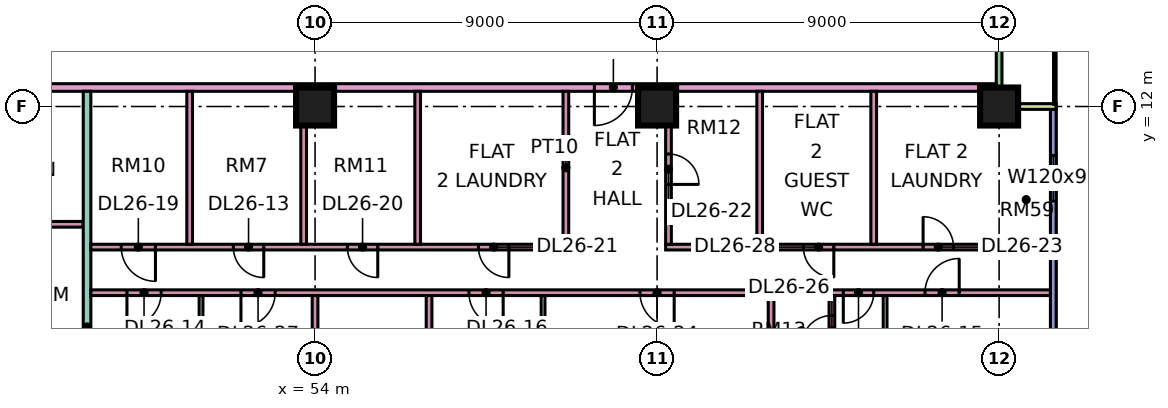
"""IFC4 building model, lengths in metres.
Left out: names, types, materials, properties, quantities, classifications, styles, units other than length and angle.
Written with IfcOpenShell. Run it as: python <this file> out.ifc"""

import sys

from ifc_helpers import new_model, si_unit, direction, frame, frame_2d, origin, origin_2d, place, context, subcontext, project, spatial, rectangle, extrude, element, fill, save


model = new_model("IFC4")
c1 = context("Model", 3, precision=1e-05, world=origin(), true_north=direction((0.0, 1.0)))
c2 = subcontext(c1, "Body", "Model", "MODEL_VIEW")
j1 = project(units=[si_unit("LENGTHUNIT", "METRE"), si_unit("PLANEANGLEUNIT", "RADIAN")], contexts=[c1])
p1 = place(None, origin())
s1 = spatial("IfcSite", under=j1, at=p1, CompositionType="ELEMENT")
p2 = place(p1, origin())
s2 = spatial("IfcBuilding", under=s1, at=p2, CompositionType="ELEMENT")
p3 = place(p2, frame((0.0, 0.0, 114.4)))
s3 = spatial("IfcBuildingStorey", under=s2, at=p3, CompositionType="ELEMENT", Elevation=114.4)
for number, where, z_axis, x_axis in (
    (1, (54.0, 12.0, 0.0), (0.0, 0.0, 1.0), (1.0, 0.0, 0.0)),
    (2, (63.0, 12.0, 0.0), (0.0, 0.0, 1.0), (1.0, 0.0, 0.0)),
    (3, (72.0, 12.0, 0.0), (0.0, 0.0, 1.0), (1.0, 0.0, 0.0)),
):
    element("IfcColumn", number, at=place(p3, frame(where, z_axis=z_axis, x_axis=x_axis)), inside=s3, PredefinedType="COLUMN", context=c2, shape_type="SweptSolid", body=[
        extrude(rectangle(XDim=1.0, YDim=1.0, at=origin_2d()), origin(), (0.0, 0.0, 1.0), 3.75),
    ])
p4 = place(p3, frame((73.425, 1.5, 0.0), z_axis=(0.0, 0.0, 1.0), x_axis=(0.0, 1.0, 0.0)))
e4 = element("IfcWall", 4, at=p4, inside=s3, PredefinedType="SOLIDWALL", context=c2, shape_type="SweptSolid", body=[
    extrude(rectangle(XDim=10.425, YDim=0.15, at=frame_2d((5.212, 0.0))), origin(), (0.0, 0.0, 1.0), 3.35),
])
p5 = place(p4, frame((1.3, 0.0, 0.45)))
e5 = element("IfcOpeningElement", 5, at=p5, cuts=e4, PredefinedType="OPENING", context=c2, shape_type="SweptSolid", body=[
    extrude(rectangle(XDim=3.0, YDim=2.4, at=frame_2d((1.5, 1.2))), frame((0.0, 0.085, 0.0), z_axis=(0.0, -1.0, 0.0), x_axis=(1.0, 0.0, 0.0)), (0.0, 0.0, 1.0), 0.17),
])
p6 = place(p4, frame((8.012, 0.0, 1.7)))
e6 = element("IfcOpeningElement", 6, at=p6, cuts=e4, PredefinedType="OPENING", context=c2, shape_type="SweptSolid", body=[
    extrude(rectangle(XDim=1.2, YDim=0.9, at=frame_2d((0.6, 0.45))), frame((0.0, 0.085, 0.0), z_axis=(0.0, -1.0, 0.0), x_axis=(1.0, 0.0, 0.0)), (0.0, 0.0, 1.0), 0.17),
])
p7 = place(p3, frame((72.0, 12.075, 0.0), z_axis=(0.0, 0.0, 1.0), x_axis=(0.0, 1.0, 0.0)))
e7 = element("IfcWall", 7, at=p7, inside=s3, PredefinedType="SOLIDWALL", context=c2, shape_type="SweptSolid", body=[
    extrude(rectangle(XDim=10.35, YDim=0.15, at=frame_2d((5.175, 0.0))), origin(), (0.0, 0.0, 1.0), 3.35),
])
p8 = place(p7, frame((3.975, 0.0, 0.45)))
e8 = element("IfcOpeningElement", 8, at=p8, cuts=e7, PredefinedType="OPENING", context=c2, shape_type="SweptSolid", body=[
    extrude(rectangle(XDim=2.4, YDim=2.4, at=frame_2d((1.2, 1.2))), frame((0.0, 0.085, 0.0), z_axis=(0.0, -1.0, 0.0), x_axis=(1.0, 0.0, 0.0)), (0.0, 0.0, 1.0), 0.17),
])
p9 = place(p7, frame((7.688, 0.0, 0.0)))
e9 = element("IfcOpeningElement", 9, at=p9, cuts=e7, PredefinedType="OPENING", context=c2, shape_type="SweptSolid", body=[
    extrude(rectangle(XDim=1.8, YDim=2.4, at=frame_2d((0.9, 1.2))), frame((0.0, 0.085, 0.0), z_axis=(0.0, -1.0, 0.0), x_axis=(1.0, 0.0, 0.0)), (0.0, 0.0, 1.0), 0.17),
])
p10 = place(p3, frame((73.5, 12.0, 0.0), z_axis=(0.0, 0.0, 1.0), x_axis=(-1.0, 0.0, 0.0)))
e10 = element("IfcWall", 10, at=p10, inside=s3, PredefinedType="SOLIDWALL", context=c2, shape_type="SweptSolid", body=[
    extrude(rectangle(XDim=1.5, YDim=0.15, at=frame_2d((0.75, 0.0))), origin(), (0.0, 0.0, 1.0), 3.35),
])
p11 = place(p3, frame((40.65, 12.5, 0.0), z_axis=(0.0, 0.0, 1.0), x_axis=(1.0, 0.0, 0.0)))
e11 = element("IfcWall", 11, at=p11, inside=s3, PredefinedType="PARTITIONING", context=c2, shape_type="SweptSolid", body=[
    extrude(rectangle(XDim=31.276, YDim=0.2, at=frame_2d((15.638, 0.0))), origin(), (0.0, 0.0, 1.0), 3.35),
])
p12 = place(p11, frame((20.7, 0.0, 0.0)))
e12 = element("IfcOpeningElement", 12, at=p12, cuts=e11, PredefinedType="OPENING", context=c2, shape_type="SweptSolid", body=[
    extrude(rectangle(XDim=1.0, YDim=2.1, at=frame_2d((0.5, 1.05))), frame((0.0, 0.11, 0.0), z_axis=(0.0, -1.0, 0.0), x_axis=(1.0, 0.0, 0.0)), (0.0, 0.0, 1.0), 0.22),
])
p13 = place(p11, frame((1.05, 0.0, 0.0)))
e13 = element("IfcOpeningElement", 13, at=p13, cuts=e11, PredefinedType="OPENING", context=c2, shape_type="SweptSolid", body=[
    extrude(rectangle(XDim=1.0, YDim=2.1, at=frame_2d((0.5, 1.05))), frame((0.0, 0.11, 0.0), z_axis=(0.0, -1.0, 0.0), x_axis=(1.0, 0.0, 0.0)), (0.0, 0.0, 1.0), 0.22),
])
p14 = place(p3, frame((43.725, 8.9, 0.0), z_axis=(0.0, 0.0, 1.0), x_axis=(1.0, 0.0, 0.0)))
e14 = element("IfcWall", 14, at=p14, inside=s3, PredefinedType="PARTITIONING", context=c2, shape_type="SweptSolid", body=[
    extrude(rectangle(XDim=4.175, YDim=0.15, at=frame_2d((2.087, 0.0))), origin(), (0.0, 0.0, 1.0), 3.35),
])
p15 = place(p3, frame((48.0, 0.0, 0.0), z_axis=(0.0, 0.0, 1.0), x_axis=(0.0, 1.0, 0.0)))
e15 = element("IfcWall", 15, at=p15, inside=s3, PredefinedType="PARTITIONING", context=c2, shape_type="SweptSolid", body=[
    extrude(rectangle(XDim=12.4, YDim=0.2, at=frame_2d((6.2, 0.0))), origin(), (0.0, 0.0, 1.0), 3.35),
])
p16 = place(p3, frame((48.1, 7.1, 0.0), z_axis=(0.0, 0.0, 1.0), x_axis=(1.0, 0.0, 0.0)))
e16 = element("IfcWall", 16, at=p16, inside=s3, PredefinedType="PARTITIONING", context=c2, shape_type="SweptSolid", body=[
    extrude(rectangle(XDim=25.25, YDim=0.15, at=frame_2d((12.625, 0.0))), origin(), (0.0, 0.0, 1.0), 3.35),
])
p17 = place(p16, frame((0.95, 0.0, 0.0)))
e17 = element("IfcOpeningElement", 17, at=p17, cuts=e16, PredefinedType="OPENING", context=c2, shape_type="SweptSolid", body=[
    extrude(rectangle(XDim=0.9, YDim=2.1, at=frame_2d((0.45, 1.05))), frame((0.0, 0.085, 0.0), z_axis=(0.0, -1.0, 0.0), x_axis=(1.0, 0.0, 0.0)), (0.0, 0.0, 1.0), 0.17),
])
p18 = place(p16, frame((21.95, 0.0, 0.0)))
e18 = element("IfcOpeningElement", 18, at=p18, cuts=e16, PredefinedType="OPENING", context=c2, shape_type="SweptSolid", body=[
    extrude(rectangle(XDim=0.9, YDim=2.1, at=frame_2d((0.45, 1.05))), frame((0.0, 0.085, 0.0), z_axis=(0.0, -1.0, 0.0), x_axis=(1.0, 0.0, 0.0)), (0.0, 0.0, 1.0), 0.17),
])
p19 = place(p16, frame((9.95, 0.0, 0.0)))
e19 = element("IfcOpeningElement", 19, at=p19, cuts=e16, PredefinedType="OPENING", context=c2, shape_type="SweptSolid", body=[
    extrude(rectangle(XDim=0.9, YDim=2.1, at=frame_2d((0.45, 1.05))), frame((0.0, 0.085, 0.0), z_axis=(0.0, -1.0, 0.0), x_axis=(1.0, 0.0, 0.0)), (0.0, 0.0, 1.0), 0.17),
])
p20 = place(p16, frame((14.45, 0.0, 0.0)))
e20 = element("IfcOpeningElement", 20, at=p20, cuts=e16, PredefinedType="OPENING", context=c2, shape_type="SweptSolid", body=[
    extrude(rectangle(XDim=0.9, YDim=2.1, at=frame_2d((0.45, 1.05))), frame((0.0, 0.085, 0.0), z_axis=(0.0, -1.0, 0.0), x_axis=(1.0, 0.0, 0.0)), (0.0, 0.0, 1.0), 0.17),
])
p21 = place(p16, frame((19.8, 0.0, 0.0)))
e21 = element("IfcOpeningElement", 21, at=p21, cuts=e16, PredefinedType="OPENING", context=c2, shape_type="SweptSolid", body=[
    extrude(rectangle(XDim=0.8, YDim=2.1, at=frame_2d((0.4, 1.05))), frame((0.0, 0.085, 0.0), z_axis=(0.0, -1.0, 0.0), x_axis=(1.0, 0.0, 0.0)), (0.0, 0.0, 1.0), 0.17),
])
p22 = place(p16, frame((3.95, 0.0, 0.0)))
e22 = element("IfcOpeningElement", 22, at=p22, cuts=e16, PredefinedType="OPENING", context=c2, shape_type="SweptSolid", body=[
    extrude(rectangle(XDim=0.9, YDim=2.1, at=frame_2d((0.45, 1.05))), frame((0.0, 0.085, 0.0), z_axis=(0.0, -1.0, 0.0), x_axis=(1.0, 0.0, 0.0)), (0.0, 0.0, 1.0), 0.17),
])
p23 = place(p3, frame((48.1, 8.3, 0.0), z_axis=(0.0, 0.0, 1.0), x_axis=(1.0, 0.0, 0.0)))
e23 = element("IfcWall", 23, at=p23, inside=s3, PredefinedType="PARTITIONING", context=c2, shape_type="SweptSolid", body=[
    extrude(rectangle(XDim=12.575, YDim=0.15, at=frame_2d((6.288, 0.0))), origin(), (0.0, 0.0, 1.0), 3.35),
])
p24 = place(p23, frame((3.75, 0.0, 0.0)))
e24 = element("IfcOpeningElement", 24, at=p24, cuts=e23, PredefinedType="OPENING", context=c2, shape_type="SweptSolid", body=[
    extrude(rectangle(XDim=0.8, YDim=2.1, at=frame_2d((0.4, 1.05))), frame((0.0, 0.085, 0.0), z_axis=(0.0, -1.0, 0.0), x_axis=(1.0, 0.0, 0.0)), (0.0, 0.0, 1.0), 0.17),
])
p25 = place(p23, frame((0.8, 0.0, 0.0)))
e25 = element("IfcOpeningElement", 25, at=p25, cuts=e23, PredefinedType="OPENING", context=c2, shape_type="SweptSolid", body=[
    extrude(rectangle(XDim=0.9, YDim=2.1, at=frame_2d((0.45, 1.05))), frame((0.0, 0.085, 0.0), z_axis=(0.0, -1.0, 0.0), x_axis=(1.0, 0.0, 0.0)), (0.0, 0.0, 1.0), 0.17),
])
p26 = place(p23, frame((6.75, 0.0, 0.0)))
e26 = element("IfcOpeningElement", 26, at=p26, cuts=e23, PredefinedType="OPENING", context=c2, shape_type="SweptSolid", body=[
    extrude(rectangle(XDim=0.8, YDim=2.1, at=frame_2d((0.4, 1.05))), frame((0.0, 0.085, 0.0), z_axis=(0.0, -1.0, 0.0), x_axis=(1.0, 0.0, 0.0)), (0.0, 0.0, 1.0), 0.17),
])
p27 = place(p23, frame((10.2, 0.0, 0.0)))
e27 = element("IfcOpeningElement", 27, at=p27, cuts=e23, PredefinedType="OPENING", context=c2, shape_type="SweptSolid", body=[
    extrude(rectangle(XDim=0.8, YDim=2.1, at=frame_2d((0.4, 1.05))), frame((0.0, 0.085, 0.0), z_axis=(0.0, -1.0, 0.0), x_axis=(1.0, 0.0, 0.0)), (0.0, 0.0, 1.0), 0.17),
])
p28 = place(p3, frame((50.7, 8.375, 0.0), z_axis=(0.0, 0.0, 1.0), x_axis=(0.0, 1.0, 0.0)))
e28 = element("IfcWall", 28, at=p28, inside=s3, PredefinedType="PARTITIONING", context=c2, shape_type="SweptSolid", body=[
    extrude(rectangle(XDim=4.025, YDim=0.15, at=frame_2d((2.012, 0.0))), origin(), (0.0, 0.0, 1.0), 3.35),
])
p29 = place(p3, frame((51.0, -1.35, 0.0), z_axis=(0.0, 0.0, 1.0), x_axis=(0.0, 1.0, 0.0)))
e29 = element("IfcWall", 29, at=p29, inside=s3, PredefinedType="PARTITIONING", context=c2, shape_type="SweptSolid", body=[
    extrude(rectangle(XDim=8.375, YDim=0.1, at=frame_2d((4.188, 0.0))), origin(), (0.0, 0.0, 1.0), 3.35),
])
p30 = place(p3, frame((53.7, 8.375, 0.0), z_axis=(0.0, 0.0, 1.0), x_axis=(0.0, 1.0, 0.0)))
e30 = element("IfcWall", 30, at=p30, inside=s3, PredefinedType="PARTITIONING", context=c2, shape_type="SweptSolid", body=[
    extrude(rectangle(XDim=4.025, YDim=0.15, at=frame_2d((2.012, 0.0))), origin(), (0.0, 0.0, 1.0), 3.35),
])
p31 = place(p3, frame((54.0, 0.0, 0.0), z_axis=(0.0, 0.0, 1.0), x_axis=(0.0, 1.0, 0.0)))
e31 = element("IfcWall", 31, at=p31, inside=s3, PredefinedType="PARTITIONING", context=c2, shape_type="SweptSolid", body=[
    extrude(rectangle(XDim=7.025, YDim=0.15, at=frame_2d((3.512, 0.0))), origin(), (0.0, 0.0, 1.0), 3.35),
])
p32 = place(p3, frame((56.7, 8.375, 0.0), z_axis=(0.0, 0.0, 1.0), x_axis=(0.0, 1.0, 0.0)))
e32 = element("IfcWall", 32, at=p32, inside=s3, PredefinedType="PARTITIONING", context=c2, shape_type="SweptSolid", body=[
    extrude(rectangle(XDim=4.025, YDim=0.15, at=frame_2d((2.012, 0.0))), origin(), (0.0, 0.0, 1.0), 3.35),
])
p33 = place(p3, frame((57.0, 4.025, 0.0), z_axis=(0.0, 0.0, 1.0), x_axis=(0.0, 1.0, 0.0)))
e33 = element("IfcWall", 33, at=p33, inside=s3, PredefinedType="PARTITIONING", context=c2, shape_type="SweptSolid", body=[
    extrude(rectangle(XDim=3.0, YDim=0.15, at=frame_2d((1.5, 0.0))), origin(), (0.0, 0.0, 1.0), 3.35),
])
p34 = place(p33, frame((1.225, 0.0, 0.0)))
e34 = element("IfcOpeningElement", 34, at=p34, cuts=e33, PredefinedType="OPENING", context=c2, shape_type="SweptSolid", body=[
    extrude(rectangle(XDim=0.8, YDim=2.1, at=frame_2d((0.4, 1.05))), frame((0.0, 0.085, 0.0), z_axis=(0.0, -1.0, 0.0), x_axis=(1.0, 0.0, 0.0)), (0.0, 0.0, 1.0), 0.17),
])
p35 = place(p3, frame((60.0, 0.0, 0.0), z_axis=(0.0, 0.0, 1.0), x_axis=(0.0, 1.0, 0.0)))
e35 = element("IfcWall", 35, at=p35, inside=s3, PredefinedType="PARTITIONING", context=c2, shape_type="SweptSolid", body=[
    extrude(rectangle(XDim=7.025, YDim=0.1, at=frame_2d((3.512, 0.0))), origin(), (0.0, 0.0, 1.0), 3.35),
])
p36 = place(p3, frame((60.6, 8.375, 0.0), z_axis=(0.0, 0.0, 1.0), x_axis=(0.0, 1.0, 0.0)))
e36 = element("IfcWall", 36, at=p36, inside=s3, PredefinedType="PARTITIONING", context=c2, shape_type="SweptSolid", body=[
    extrude(rectangle(XDim=4.025, YDim=0.15, at=frame_2d((2.012, 0.0))), origin(), (0.0, 0.0, 1.0), 3.35),
])
p37 = place(p3, frame((63.225, 8.3, 0.0), z_axis=(0.0, 0.0, 1.0), x_axis=(1.0, 0.0, 0.0)))
e37 = element("IfcWall", 37, at=p37, inside=s3, PredefinedType="PARTITIONING", context=c2, shape_type="SweptSolid", body=[
    extrude(rectangle(XDim=10.125, YDim=0.15, at=frame_2d((5.062, 0.0))), origin(), (0.0, 0.0, 1.0), 3.35),
])
p38 = place(p37, frame((6.775, 0.0, 0.0)))
e38 = element("IfcOpeningElement", 38, at=p38, cuts=e37, PredefinedType="OPENING", context=c2, shape_type="SweptSolid", body=[
    extrude(rectangle(XDim=0.8, YDim=2.1, at=frame_2d((0.4, 1.05))), frame((0.0, 0.085, 0.0), z_axis=(0.0, -1.0, 0.0), x_axis=(1.0, 0.0, 0.0)), (0.0, 0.0, 1.0), 0.17),
])
p39 = place(p37, frame((3.625, 0.0, 0.0)))
e39 = element("IfcOpeningElement", 39, at=p39, cuts=e37, PredefinedType="OPENING", context=c2, shape_type="SweptSolid", body=[
    extrude(rectangle(XDim=0.8, YDim=2.1, at=frame_2d((0.4, 1.05))), frame((0.0, 0.085, 0.0), z_axis=(0.0, -1.0, 0.0), x_axis=(1.0, 0.0, 0.0)), (0.0, 0.0, 1.0), 0.17),
])
p40 = place(p3, frame((63.3, 8.375, 0.0), z_axis=(0.0, 0.0, 1.0), x_axis=(0.0, 1.0, 0.0)))
e40 = element("IfcWall", 40, at=p40, inside=s3, PredefinedType="PARTITIONING", context=c2, shape_type="SweptSolid", body=[
    extrude(rectangle(XDim=4.025, YDim=0.15, at=frame_2d((2.012, 0.0))), origin(), (0.0, 0.0, 1.0), 3.35),
])
p41 = place(p40, frame((1.575, 0.0, 0.0)))
e41 = element("IfcOpeningElement", 41, at=p41, cuts=e40, PredefinedType="OPENING", context=c2, shape_type="SweptSolid", body=[
    extrude(rectangle(XDim=0.8, YDim=2.1, at=frame_2d((0.4, 1.05))), frame((0.0, 0.085, 0.0), z_axis=(0.0, -1.0, 0.0), x_axis=(1.0, 0.0, 0.0)), (0.0, 0.0, 1.0), 0.17),
])
p42 = place(p3, frame((65.7, 8.375, 0.0), z_axis=(0.0, 0.0, 1.0), x_axis=(0.0, 1.0, 0.0)))
e42 = element("IfcWall", 42, at=p42, inside=s3, PredefinedType="PARTITIONING", context=c2, shape_type="SweptSolid", body=[
    extrude(rectangle(XDim=4.025, YDim=0.15, at=frame_2d((2.012, 0.0))), origin(), (0.0, 0.0, 1.0), 3.35),
])
p43 = place(p3, frame((66.0, 0.074, 0.0), z_axis=(0.0, 0.0, 1.0), x_axis=(0.0, 1.0, 0.0)))
e43 = element("IfcWall", 43, at=p43, inside=s3, PredefinedType="PARTITIONING", context=c2, shape_type="SweptSolid", body=[
    extrude(rectangle(XDim=6.951, YDim=0.15, at=frame_2d((3.476, 0.0))), origin(), (0.0, 0.0, 1.0), 3.35),
])
p44 = place(p3, frame((67.6, 5.025, 0.0), z_axis=(0.0, 0.0, 1.0), x_axis=(0.0, 1.0, 0.0)))
e44 = element("IfcWall", 44, at=p44, inside=s3, PredefinedType="PARTITIONING", context=c2, shape_type="SweptSolid", body=[
    extrude(rectangle(XDim=2.0, YDim=0.15, at=frame_2d((1.0, 0.0))), origin(), (0.0, 0.0, 1.0), 3.35),
])
p45 = place(p44, frame((0.675, 0.0, 0.0)))
e45 = element("IfcOpeningElement", 45, at=p45, cuts=e44, PredefinedType="OPENING", context=c2, shape_type="SweptSolid", body=[
    extrude(rectangle(XDim=0.8, YDim=2.1, at=frame_2d((0.4, 1.05))), frame((0.0, 0.085, 0.0), z_axis=(0.0, -1.0, 0.0), x_axis=(1.0, 0.0, 0.0)), (0.0, 0.0, 1.0), 0.17),
])
p46 = place(p3, frame((68.7, 8.375, 0.0), z_axis=(0.0, 0.0, 1.0), x_axis=(0.0, 1.0, 0.0)))
e46 = element("IfcWall", 46, at=p46, inside=s3, PredefinedType="PARTITIONING", context=c2, shape_type="SweptSolid", body=[
    extrude(rectangle(XDim=4.025, YDim=0.15, at=frame_2d((2.012, 0.0))), origin(), (0.0, 0.0, 1.0), 3.35),
])
p47 = place(p3, frame((69.0, 0.074, 0.0), z_axis=(0.0, 0.0, 1.0), x_axis=(0.0, 1.0, 0.0)))
e47 = element("IfcWall", 47, at=p47, inside=s3, PredefinedType="PARTITIONING", context=c2, shape_type="SweptSolid", body=[
    extrude(rectangle(XDim=6.951, YDim=0.1, at=frame_2d((3.476, 0.0))), origin(), (0.0, 0.0, 1.0), 3.35),
])
p48 = place(p6, origin())
e48 = element("IfcWindow", 48, at=p48, inside=s3, PartitioningType="SINGLE_PANEL", PredefinedType="WINDOW", context=c2, shape_type="SweptSolid", body=[
    extrude(rectangle(XDim=1.2, YDim=0.9, at=frame_2d((0.6, 0.45))), frame((0.0, 0.03, 0.0), z_axis=(0.0, -1.0, 0.0), x_axis=(1.0, 0.0, 0.0)), (0.0, 0.0, 1.0), 0.06),
])
fill(e6, e48)
p49 = place(p24, origin())
e49 = element("IfcDoor", 49, at=p49, inside=s3, OperationType="SINGLE_SWING_RIGHT", PredefinedType="DOOR", context=c2, shape_type="SweptSolid", body=[
    extrude(rectangle(XDim=0.8, YDim=2.1, at=frame_2d((0.4, 1.05))), frame((0.0, 0.025, 0.0), z_axis=(0.0, -1.0, 0.0), x_axis=(1.0, 0.0, 0.0)), (0.0, 0.0, 1.0), 0.05),
])
fill(e24, e49)
p50 = place(p17, frame((0.9, 0.0, 0.0), z_axis=(0.0, 0.0, 1.0), x_axis=(-1.0, 0.0, 0.0)))
e50 = element("IfcDoor", 50, at=p50, inside=s3, OperationType="SINGLE_SWING_LEFT", PredefinedType="DOOR", context=c2, shape_type="SweptSolid", body=[
    extrude(rectangle(XDim=0.9, YDim=2.1, at=frame_2d((0.45, 1.05))), frame((0.0, 0.025, 0.0), z_axis=(0.0, -1.0, 0.0), x_axis=(1.0, 0.0, 0.0)), (0.0, 0.0, 1.0), 0.05),
])
fill(e17, e50)
p51 = place(p18, frame((0.9, 0.0, 0.0), z_axis=(0.0, 0.0, 1.0), x_axis=(-1.0, 0.0, 0.0)))
e51 = element("IfcDoor", 51, at=p51, inside=s3, OperationType="SINGLE_SWING_RIGHT", PredefinedType="DOOR", context=c2, shape_type="SweptSolid", body=[
    extrude(rectangle(XDim=0.9, YDim=2.1, at=frame_2d((0.45, 1.05))), frame((0.0, 0.025, 0.0), z_axis=(0.0, -1.0, 0.0), x_axis=(1.0, 0.0, 0.0)), (0.0, 0.0, 1.0), 0.05),
])
fill(e18, e51)
p52 = place(p19, origin())
e52 = element("IfcDoor", 52, at=p52, inside=s3, OperationType="SINGLE_SWING_RIGHT", PredefinedType="DOOR", context=c2, shape_type="SweptSolid", body=[
    extrude(rectangle(XDim=0.9, YDim=2.1, at=frame_2d((0.45, 1.05))), frame((0.0, 0.025, 0.0), z_axis=(0.0, -1.0, 0.0), x_axis=(1.0, 0.0, 0.0)), (0.0, 0.0, 1.0), 0.05),
])
fill(e19, e52)
p53 = place(p12, frame((1.0, 0.0, 0.0), z_axis=(0.0, 0.0, 1.0), x_axis=(-1.0, 0.0, 0.0)))
e53 = element("IfcDoor", 53, at=p53, inside=s3, OperationType="SINGLE_SWING_LEFT", PredefinedType="DOOR", context=c2, shape_type="SweptSolid", body=[
    extrude(rectangle(XDim=1.0, YDim=2.1, at=frame_2d((0.5, 1.05))), frame((0.0, 0.025, 0.0), z_axis=(0.0, -1.0, 0.0), x_axis=(1.0, 0.0, 0.0)), (0.0, 0.0, 1.0), 0.05),
])
fill(e12, e53)
p54 = place(p25, origin())
e54 = element("IfcDoor", 54, at=p54, inside=s3, OperationType="SINGLE_SWING_RIGHT", PredefinedType="DOOR", context=c2, shape_type="SweptSolid", body=[
    extrude(rectangle(XDim=0.9, YDim=2.1, at=frame_2d((0.45, 1.05))), frame((0.0, 0.025, 0.0), z_axis=(0.0, -1.0, 0.0), x_axis=(1.0, 0.0, 0.0)), (0.0, 0.0, 1.0), 0.05),
])
fill(e25, e54)
p55 = place(p26, origin())
e55 = element("IfcDoor", 55, at=p55, inside=s3, OperationType="SINGLE_SWING_RIGHT", PredefinedType="DOOR", context=c2, shape_type="SweptSolid", body=[
    extrude(rectangle(XDim=0.8, YDim=2.1, at=frame_2d((0.4, 1.05))), frame((0.0, 0.025, 0.0), z_axis=(0.0, -1.0, 0.0), x_axis=(1.0, 0.0, 0.0)), (0.0, 0.0, 1.0), 0.05),
])
fill(e26, e55)
p56 = place(p27, origin())
e56 = element("IfcDoor", 56, at=p56, inside=s3, OperationType="SINGLE_SWING_RIGHT", PredefinedType="DOOR", context=c2, shape_type="SweptSolid", body=[
    extrude(rectangle(XDim=0.8, YDim=2.1, at=frame_2d((0.4, 1.05))), frame((0.0, 0.025, 0.0), z_axis=(0.0, -1.0, 0.0), x_axis=(1.0, 0.0, 0.0)), (0.0, 0.0, 1.0), 0.05),
])
fill(e27, e56)
p57 = place(p41, frame((0.8, 0.0, 0.0), z_axis=(0.0, 0.0, 1.0), x_axis=(-1.0, 0.0, 0.0)))
e57 = element("IfcDoor", 57, at=p57, inside=s3, OperationType="SINGLE_SWING_LEFT", PredefinedType="DOOR", context=c2, shape_type="SweptSolid", body=[
    extrude(rectangle(XDim=0.8, YDim=2.1, at=frame_2d((0.4, 1.05))), frame((0.0, 0.025, 0.0), z_axis=(0.0, -1.0, 0.0), x_axis=(1.0, 0.0, 0.0)), (0.0, 0.0, 1.0), 0.05),
])
fill(e41, e57)
p58 = place(p38, origin())
e58 = element("IfcDoor", 58, at=p58, inside=s3, OperationType="SINGLE_SWING_LEFT", PredefinedType="DOOR", context=c2, shape_type="SweptSolid", body=[
    extrude(rectangle(XDim=0.8, YDim=2.1, at=frame_2d((0.4, 1.05))), frame((0.0, 0.025, 0.0), z_axis=(0.0, -1.0, 0.0), x_axis=(1.0, 0.0, 0.0)), (0.0, 0.0, 1.0), 0.05),
])
fill(e38, e58)
p59 = place(p20, origin())
e59 = element("IfcDoor", 59, at=p59, inside=s3, OperationType="SINGLE_SWING_RIGHT", PredefinedType="DOOR", context=c2, shape_type="SweptSolid", body=[
    extrude(rectangle(XDim=0.9, YDim=2.1, at=frame_2d((0.45, 1.05))), frame((0.0, 0.025, 0.0), z_axis=(0.0, -1.0, 0.0), x_axis=(1.0, 0.0, 0.0)), (0.0, 0.0, 1.0), 0.05),
])
fill(e20, e59)
p60 = place(p21, frame((0.8, 0.0, 0.0), z_axis=(0.0, 0.0, 1.0), x_axis=(-1.0, 0.0, 0.0)))
e60 = element("IfcDoor", 60, at=p60, inside=s3, OperationType="SINGLE_SWING_LEFT", PredefinedType="DOOR", context=c2, shape_type="SweptSolid", body=[
    extrude(rectangle(XDim=0.8, YDim=2.1, at=frame_2d((0.4, 1.05))), frame((0.0, 0.025, 0.0), z_axis=(0.0, -1.0, 0.0), x_axis=(1.0, 0.0, 0.0)), (0.0, 0.0, 1.0), 0.05),
])
fill(e21, e60)
p61 = place(p45, origin())
e61 = element("IfcDoor", 61, at=p61, inside=s3, OperationType="SINGLE_SWING_LEFT", PredefinedType="DOOR", context=c2, shape_type="SweptSolid", body=[
    extrude(rectangle(XDim=0.8, YDim=2.1, at=frame_2d((0.4, 1.05))), frame((0.0, 0.025, 0.0), z_axis=(0.0, -1.0, 0.0), x_axis=(1.0, 0.0, 0.0)), (0.0, 0.0, 1.0), 0.05),
])
fill(e45, e61)
p62 = place(p22, frame((0.9, 0.0, 0.0), z_axis=(0.0, 0.0, 1.0), x_axis=(-1.0, 0.0, 0.0)))
e62 = element("IfcDoor", 62, at=p62, inside=s3, OperationType="SINGLE_SWING_LEFT", PredefinedType="DOOR", context=c2, shape_type="SweptSolid", body=[
    extrude(rectangle(XDim=0.9, YDim=2.1, at=frame_2d((0.45, 1.05))), frame((0.0, 0.025, 0.0), z_axis=(0.0, -1.0, 0.0), x_axis=(1.0, 0.0, 0.0)), (0.0, 0.0, 1.0), 0.05),
])
fill(e22, e62)
p63 = place(p39, origin())
e63 = element("IfcDoor", 63, at=p63, inside=s3, OperationType="SINGLE_SWING_RIGHT", PredefinedType="DOOR", context=c2, shape_type="SweptSolid", body=[
    extrude(rectangle(XDim=0.8, YDim=2.1, at=frame_2d((0.4, 1.05))), frame((0.0, 0.025, 0.0), z_axis=(0.0, -1.0, 0.0), x_axis=(1.0, 0.0, 0.0)), (0.0, 0.0, 1.0), 0.05),
])
fill(e39, e63)
save(model, sys.argv[1])
